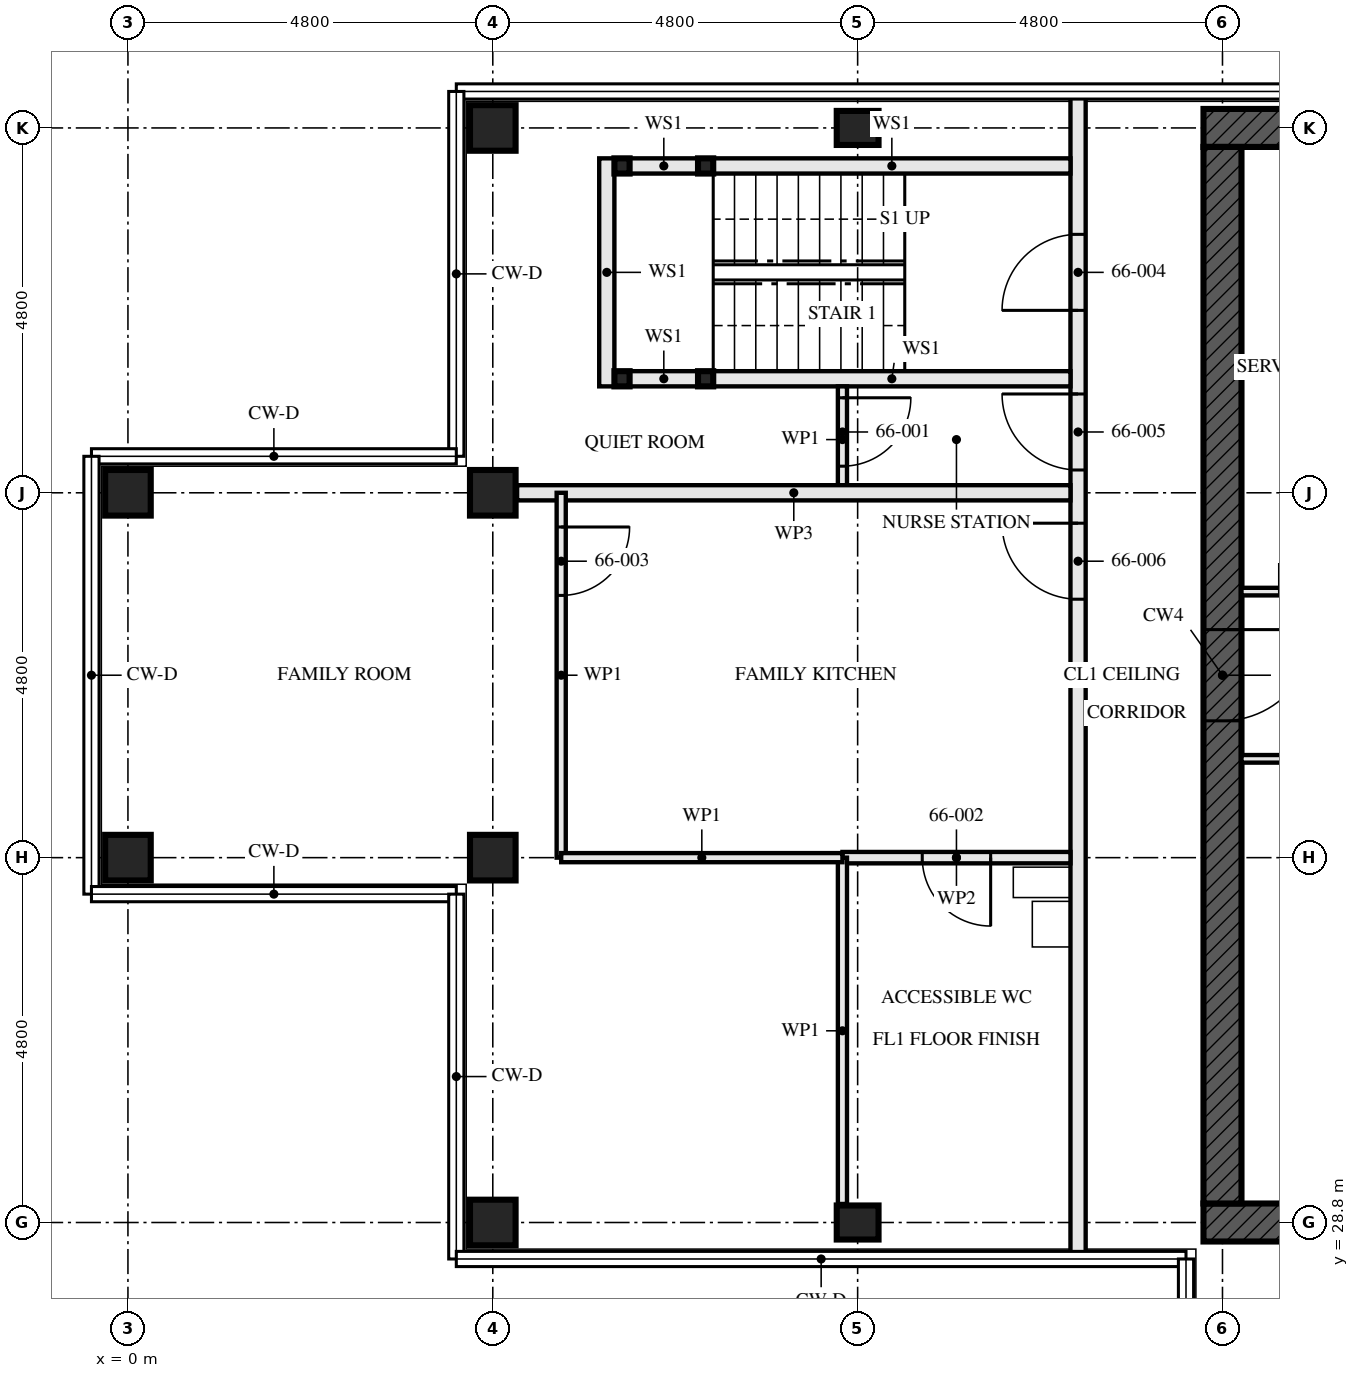
"""IFC4 building model, lengths in metres.
Left out: names, types, materials, properties, quantities, classifications, styles, units other than length and angle.
Written with IfcOpenShell. Run it as: python <this file> out.ifc"""

import sys

from ifc_helpers import new_model, si_unit, direction, frame, frame_2d, origin, origin_2d, place, context, subcontext, project, spatial, rectangle, hollow_rectangle, i_section, extrude, element, fill, save


model = new_model("IFC4")
c1 = context("Model", 3, precision=1e-05, world=origin(), true_north=direction((0.0, 1.0)))
c2 = subcontext(c1, "Body", "Model", "MODEL_VIEW")
j1 = project(units=[si_unit("LENGTHUNIT", "METRE"), si_unit("PLANEANGLEUNIT", "RADIAN")], contexts=[c1])
p1 = place(None, origin())
s1 = spatial("IfcSite", under=j1, at=p1, CompositionType="ELEMENT")
p2 = place(p1, origin())
s2 = spatial("IfcBuilding", under=s1, at=p2, CompositionType="ELEMENT")
p3 = place(p2, frame((0.0, 0.0, 240.0)))
s3 = spatial("IfcBuildingStorey", under=s2, at=p3, CompositionType="ELEMENT", Elevation=240.0)
for number, where, z_axis, x_axis in (
    (1, (0.0, 33.6, 0.0), (0.0, 0.0, 1.0), (0.0, 1.0, 0.0)),
    (2, (0.0, 38.4, 0.0), (0.0, 0.0, 1.0), (0.0, 1.0, 0.0)),
    (3, (4.8, 28.8, 0.0), (0.0, 0.0, 1.0), (0.0, 1.0, 0.0)),
    (4, (4.8, 33.6, 0.0), (0.0, 0.0, 1.0), (0.0, 1.0, 0.0)),
    (5, (4.8, 38.4, 0.0), (0.0, 0.0, 1.0), (0.0, 1.0, 0.0)),
    (6, (4.8, 43.2, 0.0), (0.0, 0.0, 1.0), (0.0, 1.0, 0.0)),
):
    element("IfcColumn", number, at=place(p3, frame(where, z_axis=z_axis, x_axis=x_axis)), inside=s3, PredefinedType="COLUMN", context=c2, shape_type="SweptSolid", body=[
        extrude(hollow_rectangle(XDim=0.6, YDim=0.6, WallThickness=0.05, at=origin_2d()), origin(), (0.0, 0.0, 1.0), 3.5),
    ])
for number, where, z_axis, x_axis in (
    (7, (9.6, 28.8, 0.0), (0.0, 0.0, 1.0), (0.0, 1.0, 0.0)),
    (8, (9.6, 43.2, 0.0), (0.0, 0.0, 1.0), (0.0, 1.0, 0.0)),
):
    element("IfcColumn", number, at=place(p3, frame(where, z_axis=z_axis, x_axis=x_axis)), inside=s3, PredefinedType="COLUMN", context=c2, shape_type="SweptSolid", body=[
        extrude(i_section(OverallWidth=0.448, OverallDepth=0.55, WebThickness=0.072, FlangeThickness=0.115, FilletRadius=0.015, at=origin_2d()), origin(), (0.0, 0.0, 1.0), 3.5),
    ])
p4 = place(p3, frame((14.15, 28.8, -0.17), z_axis=(0.0, 0.0, 1.0), x_axis=(1.0, 0.0, 0.0)))
e9 = element("IfcWall", 9, at=p4, inside=s3, PredefinedType="SHEAR", context=c2, shape_type="SweptSolid", body=[
    extrude(rectangle(XDim=14.9, YDim=0.5, at=frame_2d((7.45, 0.0))), origin(), (0.0, 0.0, 1.0), 3.42),
])
p5 = place(p4, frame((6.85, 0.0, 0.17)))
e10 = element("IfcOpeningElement", 10, at=p5, cuts=e9, PredefinedType="OPENING", context=c2, shape_type="SweptSolid", body=[
    extrude(rectangle(XDim=1.2, YDim=2.1, at=frame_2d((0.6, 1.05))), frame((0.0, 0.26, 0.0), z_axis=(0.0, -1.0, 0.0), x_axis=(1.0, 0.0, 0.0)), (0.0, 0.0, 1.0), 0.521),
])
p6 = place(p3, frame((29.05, 43.2, -0.17), z_axis=(0.0, 0.0, 1.0), x_axis=(-1.0, 0.0, 0.0)))
e11 = element("IfcWall", 11, at=p6, inside=s3, PredefinedType="SHEAR", context=c2, shape_type="SweptSolid", body=[
    extrude(rectangle(XDim=14.9, YDim=0.5, at=frame_2d((7.45, 0.0))), origin(), (0.0, 0.0, 1.0), 3.42),
])
p7 = place(p3, frame((14.4, 42.95, -0.17), z_axis=(0.0, 0.0, 1.0), x_axis=(0.0, -1.0, 0.0)))
e12 = element("IfcWall", 12, at=p7, inside=s3, PredefinedType="SHEAR", context=c2, shape_type="SweptSolid", body=[
    extrude(rectangle(XDim=13.9, YDim=0.5, at=frame_2d((6.95, 0.0))), origin(), (0.0, 0.0, 1.0), 3.42),
])
p8 = place(p7, frame((6.35, 0.0, 0.17)))
e13 = element("IfcOpeningElement", 13, at=p8, cuts=e12, PredefinedType="OPENING", context=c2, shape_type="SweptSolid", body=[
    extrude(rectangle(XDim=1.2, YDim=2.1, at=frame_2d((0.6, 1.05))), frame((0.0, 0.26, 0.0), z_axis=(0.0, -1.0, 0.0), x_axis=(1.0, 0.0, 0.0)), (0.0, 0.0, 1.0), 0.521),
])
for number, where, z_axis, x_axis in (
    (14, (6.5, 42.7, 0.0), (0.0, 0.0, 1.0), (1.0, 0.0, 0.0)),
    (15, (6.5, 39.9, 0.0), (0.0, 0.0, 1.0), (1.0, 0.0, 0.0)),
    (16, (7.6, 42.7, 0.0), (0.0, 0.0, 1.0), (1.0, 0.0, 0.0)),
    (17, (7.6, 39.9, 0.0), (0.0, 0.0, 1.0), (1.0, 0.0, 0.0)),
):
    element("IfcColumn", number, at=place(p3, frame(where, z_axis=z_axis, x_axis=x_axis)), inside=s3, PredefinedType="COLUMN", context=c2, shape_type="SweptSolid", body=[
        extrude(hollow_rectangle(XDim=0.2, YDim=0.2, WallThickness=0.008, at=origin_2d()), origin(), (0.0, 0.0, 1.0), 3.25),
    ])
p9 = place(p3, frame((6.6, 42.7, 0.0), z_axis=(0.0, 0.0, 1.0), x_axis=(1.0, 0.0, 0.0)))
e18 = element("IfcWall", 18, at=p9, inside=s3, PredefinedType="SOLIDWALL", context=c2, shape_type="SweptSolid", body=[
    extrude(rectangle(XDim=0.9, YDim=0.2, at=frame_2d((0.45, 0.0))), origin(), (0.0, 0.0, 1.0), 2.94),
])
p10 = place(p3, frame((7.7, 42.7, 0.0), z_axis=(0.0, 0.0, 1.0), x_axis=(1.0, 0.0, 0.0)))
e19 = element("IfcWall", 19, at=p10, inside=s3, PredefinedType="SOLIDWALL", context=c2, shape_type="SweptSolid", body=[
    extrude(rectangle(XDim=4.7, YDim=0.2, at=frame_2d((2.35, 0.0))), origin(), (0.0, 0.0, 1.0), 2.94),
])
p11 = place(p3, frame((6.6, 39.9, 0.0), z_axis=(0.0, 0.0, 1.0), x_axis=(1.0, 0.0, 0.0)))
e20 = element("IfcWall", 20, at=p11, inside=s3, PredefinedType="SOLIDWALL", context=c2, shape_type="SweptSolid", body=[
    extrude(rectangle(XDim=0.9, YDim=0.2, at=frame_2d((0.45, 0.0))), origin(), (0.0, 0.0, 1.0), 2.94),
])
p12 = place(p3, frame((7.7, 39.9, 0.0), z_axis=(0.0, 0.0, 1.0), x_axis=(1.0, 0.0, 0.0)))
e21 = element("IfcWall", 21, at=p12, inside=s3, PredefinedType="SOLIDWALL", context=c2, shape_type="SweptSolid", body=[
    extrude(rectangle(XDim=4.7, YDim=0.2, at=frame_2d((2.35, 0.0))), origin(), (0.0, 0.0, 1.0), 2.94),
])
p13 = place(p3, frame((6.3, 42.8, 0.0), z_axis=(0.0, 0.0, 1.0), x_axis=(0.0, -1.0, 0.0)))
e22 = element("IfcWall", 22, at=p13, inside=s3, PredefinedType="SOLIDWALL", context=c2, shape_type="SweptSolid", body=[
    extrude(rectangle(XDim=3.0, YDim=0.2, at=frame_2d((1.5, 0.0))), origin(), (0.0, 0.0, 1.0), 3.25),
])
p14 = place(p3, frame((9.4, 39.8, 0.0), z_axis=(0.0, 0.0, 1.0), x_axis=(0.0, -1.0, 0.0)))
e23 = element("IfcWall", 23, at=p14, inside=s3, PredefinedType="PARTITIONING", context=c2, shape_type="SweptSolid", body=[
    extrude(rectangle(XDim=1.4, YDim=0.12, at=frame_2d((0.7, 0.0))), origin(), (0.0, 0.0, 1.0), 3.25),
])
p15 = place(p14, frame((0.15, 0.0, 0.0)))
e24 = element("IfcOpeningElement", 24, at=p15, cuts=e23, PredefinedType="OPENING", context=c2, shape_type="SweptSolid", body=[
    extrude(rectangle(XDim=0.9, YDim=2.1, at=frame_2d((0.45, 1.05))), frame((0.0, 0.071, 0.0), z_axis=(0.0, -1.0, 0.0), x_axis=(1.0, 0.0, 0.0)), (0.0, 0.0, 1.0), 0.141),
])
p16 = place(p3, frame((5.12, 38.4, 0.0), z_axis=(0.0, 0.0, 1.0), x_axis=(1.0, 0.0, 0.0)))
e25 = element("IfcWall", 25, at=p16, inside=s3, PredefinedType="PARTITIONING", context=c2, shape_type="SweptSolid", body=[
    extrude(rectangle(XDim=7.28, YDim=0.2, at=frame_2d((3.64, 0.0))), origin(), (0.0, 0.0, 1.0), 2.24),
])
p17 = place(p3, frame((9.4, 33.6, 0.0), z_axis=(0.0, 0.0, 1.0), x_axis=(1.0, 0.0, 0.0)))
e26 = element("IfcWall", 26, at=p17, inside=s3, PredefinedType="PARTITIONING", context=c2, shape_type="SweptSolid", body=[
    extrude(rectangle(XDim=3.0, YDim=0.15, at=frame_2d((1.5, 0.0))), origin(), (0.0, 0.0, 1.0), 2.24),
])
p18 = place(p17, frame((1.05, 0.0, 0.0)))
e27 = element("IfcOpeningElement", 27, at=p18, cuts=e26, PredefinedType="OPENING", context=c2, shape_type="SweptSolid", body=[
    extrude(rectangle(XDim=0.9, YDim=2.1, at=frame_2d((0.45, 1.05))), frame((0.0, 0.085, 0.0), z_axis=(0.0, -1.0, 0.0), x_axis=(1.0, 0.0, 0.0)), (0.0, 0.0, 1.0), 0.171),
])
p19 = place(p3, frame((5.7, 38.4, 0.0), z_axis=(0.0, 0.0, 1.0), x_axis=(0.0, -1.0, 0.0)))
e28 = element("IfcWall", 28, at=p19, inside=s3, PredefinedType="PARTITIONING", context=c2, shape_type="SweptSolid", body=[
    extrude(rectangle(XDim=4.8, YDim=0.12, at=frame_2d((2.4, 0.0))), origin(), (0.0, 0.0, 1.0), 3.25),
])
p20 = place(p19, frame((0.45, 0.0, 0.0)))
e29 = element("IfcOpeningElement", 29, at=p20, cuts=e28, PredefinedType="OPENING", context=c2, shape_type="SweptSolid", body=[
    extrude(rectangle(XDim=0.9, YDim=2.1, at=frame_2d((0.45, 1.05))), frame((0.0, 0.071, 0.0), z_axis=(0.0, -1.0, 0.0), x_axis=(1.0, 0.0, 0.0)), (0.0, 0.0, 1.0), 0.141),
])
p21 = place(p3, frame((9.4, 33.6, 0.0), z_axis=(0.0, 0.0, 1.0), x_axis=(0.0, -1.0, 0.0)))
e30 = element("IfcWall", 30, at=p21, inside=s3, PredefinedType="PARTITIONING", context=c2, shape_type="SweptSolid", body=[
    extrude(rectangle(XDim=4.556, YDim=0.12, at=frame_2d((2.278, 0.0))), origin(), (0.0, 0.0, 1.0), 3.25),
])
p22 = place(p3, frame((5.7, 33.6, 0.0), z_axis=(0.0, 0.0, 1.0), x_axis=(1.0, 0.0, 0.0)))
e31 = element("IfcWall", 31, at=p22, inside=s3, PredefinedType="PARTITIONING", context=c2, shape_type="SweptSolid", body=[
    extrude(rectangle(XDim=3.7, YDim=0.12, at=frame_2d((1.85, 0.0))), origin(), (0.0, 0.0, 1.0), 2.24),
])
p23 = place(p3, frame((12.5, 43.655, 0.0), z_axis=(0.0, 0.0, 1.0), x_axis=(0.0, -1.0, 0.0)))
e32 = element("IfcWall", 32, at=p23, inside=s3, PredefinedType="PARTITIONING", context=c2, shape_type="SweptSolid", body=[
    extrude(rectangle(XDim=15.31, YDim=0.2, at=frame_2d((7.655, 0.0))), origin(), (0.0, 0.0, 1.0), 2.24),
])
p24 = place(p23, frame((1.855, 0.0, 0.0)))
e33 = element("IfcOpeningElement", 33, at=p24, cuts=e32, PredefinedType="OPENING", context=c2, shape_type="SweptSolid", body=[
    extrude(rectangle(XDim=1.0, YDim=2.1, at=frame_2d((0.5, 1.05))), frame((0.0, 0.111, 0.0), z_axis=(0.0, -1.0, 0.0), x_axis=(1.0, 0.0, 0.0)), (0.0, 0.0, 1.0), 0.221),
])
p25 = place(p23, frame((3.955, 0.0, 0.0)))
e34 = element("IfcOpeningElement", 34, at=p25, cuts=e32, PredefinedType="OPENING", context=c2, shape_type="SweptSolid", body=[
    extrude(rectangle(XDim=1.0, YDim=2.1, at=frame_2d((0.5, 1.05))), frame((0.0, 0.111, 0.0), z_axis=(0.0, -1.0, 0.0), x_axis=(1.0, 0.0, 0.0)), (0.0, 0.0, 1.0), 0.221),
])
p26 = place(p23, frame((5.655, 0.0, 0.0)))
e35 = element("IfcOpeningElement", 35, at=p26, cuts=e32, PredefinedType="OPENING", context=c2, shape_type="SweptSolid", body=[
    extrude(rectangle(XDim=1.0, YDim=2.1, at=frame_2d((0.5, 1.05))), frame((0.0, 0.111, 0.0), z_axis=(0.0, -1.0, 0.0), x_axis=(1.0, 0.0, 0.0)), (0.0, 0.0, 1.0), 0.221),
])
p27 = place(p3, frame((14.65, 34.9, 0.0), z_axis=(0.0, 0.0, 1.0), x_axis=(1.0, 0.0, 0.0)))
e36 = element("IfcWall", 36, at=p27, inside=s3, PredefinedType="SOLIDWALL", context=c2, shape_type="SweptSolid", body=[
    extrude(rectangle(XDim=5.9, YDim=0.1, at=frame_2d((2.95, 0.0))), origin(), (0.0, 0.0, 1.0), 3.25),
])
p28 = place(p27, frame((1.6, 0.0, 0.0)))
e37 = element("IfcOpeningElement", 37, at=p28, cuts=e36, PredefinedType="OPENING", context=c2, shape_type="SweptSolid", body=[
    extrude(rectangle(XDim=0.7, YDim=2.1, at=frame_2d((0.35, 1.05))), frame((0.0, 0.061, 0.0), z_axis=(0.0, -1.0, 0.0), x_axis=(1.0, 0.0, 0.0)), (0.0, 0.0, 1.0), 0.121),
])
p29 = place(p3, frame((14.65, 37.1, 0.0), z_axis=(0.0, 0.0, 1.0), x_axis=(1.0, 0.0, 0.0)))
e38 = element("IfcWall", 38, at=p29, inside=s3, PredefinedType="SOLIDWALL", context=c2, shape_type="SweptSolid", body=[
    extrude(rectangle(XDim=5.9, YDim=0.1, at=frame_2d((2.95, 0.0))), origin(), (0.0, 0.0, 1.0), 3.25),
])
p30 = place(p29, frame((0.5, 0.0, 0.0)))
e39 = element("IfcOpeningElement", 39, at=p30, cuts=e38, PredefinedType="OPENING", context=c2, shape_type="SweptSolid", body=[
    extrude(rectangle(XDim=0.7, YDim=2.1, at=frame_2d((0.35, 1.05))), frame((0.0, 0.061, 0.0), z_axis=(0.0, -1.0, 0.0), x_axis=(1.0, 0.0, 0.0)), (0.0, 0.0, 1.0), 0.121),
])
p31 = place(p29, frame((1.9, 0.0, 0.0)))
e40 = element("IfcOpeningElement", 40, at=p31, cuts=e38, PredefinedType="OPENING", context=c2, shape_type="SweptSolid", body=[
    extrude(rectangle(XDim=0.9, YDim=2.1, at=frame_2d((0.45, 1.05))), frame((0.0, 0.061, 0.0), z_axis=(0.0, -1.0, 0.0), x_axis=(1.0, 0.0, 0.0)), (0.0, 0.0, 1.0), 0.121),
])
p32 = place(p15, origin())
e41 = element("IfcDoor", 41, at=p32, inside=s3, OperationType="SINGLE_SWING_RIGHT", PredefinedType="DOOR", context=c2, shape_type="SweptSolid", body=[
    extrude(rectangle(XDim=0.9, YDim=2.1, at=frame_2d((0.45, 1.05))), frame((0.0, 0.022, 0.0), z_axis=(0.0, -1.0, 0.0), x_axis=(1.0, 0.0, 0.0)), (0.0, 0.0, 1.0), 0.044),
])
fill(e24, e41)
p33 = place(p18, frame((0.9, 0.0, 0.0), z_axis=(0.0, 0.0, 1.0), x_axis=(-1.0, 0.0, 0.0)))
e42 = element("IfcDoor", 42, at=p33, inside=s3, OperationType="SINGLE_SWING_RIGHT", PredefinedType="DOOR", context=c2, shape_type="SweptSolid", body=[
    extrude(rectangle(XDim=0.9, YDim=2.1, at=frame_2d((0.45, 1.05))), frame((0.0, 0.022, 0.0), z_axis=(0.0, -1.0, 0.0), x_axis=(1.0, 0.0, 0.0)), (0.0, 0.0, 1.0), 0.044),
])
fill(e27, e42)
p34 = place(p20, origin())
e43 = element("IfcDoor", 43, at=p34, inside=s3, OperationType="SINGLE_SWING_RIGHT", PredefinedType="DOOR", context=c2, shape_type="SweptSolid", body=[
    extrude(rectangle(XDim=0.9, YDim=2.1, at=frame_2d((0.45, 1.05))), frame((0.0, 0.022, 0.0), z_axis=(0.0, -1.0, 0.0), x_axis=(1.0, 0.0, 0.0)), (0.0, 0.0, 1.0), 0.044),
])
fill(e29, e43)
p35 = place(p24, frame((1.0, 0.0, 0.0), z_axis=(0.0, 0.0, 1.0), x_axis=(-1.0, 0.0, 0.0)))
e44 = element("IfcDoor", 44, at=p35, inside=s3, OperationType="SINGLE_SWING_RIGHT", PredefinedType="DOOR", context=c2, shape_type="SweptSolid", body=[
    extrude(rectangle(XDim=1.0, YDim=2.1, at=frame_2d((0.5, 1.05))), frame((0.0, 0.032, 0.0), z_axis=(0.0, -1.0, 0.0), x_axis=(1.0, 0.0, 0.0)), (0.0, 0.0, 1.0), 0.064),
])
fill(e33, e44)
p36 = place(p25, frame((1.0, 0.0, 0.0), z_axis=(0.0, 0.0, 1.0), x_axis=(-1.0, 0.0, 0.0)))
e45 = element("IfcDoor", 45, at=p36, inside=s3, OperationType="SINGLE_SWING_LEFT", PredefinedType="DOOR", context=c2, shape_type="SweptSolid", body=[
    extrude(rectangle(XDim=1.0, YDim=2.1, at=frame_2d((0.5, 1.05))), frame((0.0, 0.027, 0.0), z_axis=(0.0, -1.0, 0.0), x_axis=(1.0, 0.0, 0.0)), (0.0, 0.0, 1.0), 0.054),
])
fill(e34, e45)
p37 = place(p26, frame((1.0, 0.0, 0.0), z_axis=(0.0, 0.0, 1.0), x_axis=(-1.0, 0.0, 0.0)))
e46 = element("IfcDoor", 46, at=p37, inside=s3, OperationType="SINGLE_SWING_LEFT", PredefinedType="DOOR", context=c2, shape_type="SweptSolid", body=[
    extrude(rectangle(XDim=1.0, YDim=2.1, at=frame_2d((0.5, 1.05))), frame((0.0, 0.027, 0.0), z_axis=(0.0, -1.0, 0.0), x_axis=(1.0, 0.0, 0.0)), (0.0, 0.0, 1.0), 0.054),
])
fill(e35, e46)
p38 = place(p8, origin())
e47 = element("IfcDoor", 47, at=p38, inside=s3, OperationType="SINGLE_SWING_LEFT", PredefinedType="DOOR", context=c2, shape_type="SweptSolid", body=[
    extrude(rectangle(XDim=1.2, YDim=2.1, at=frame_2d((0.6, 1.05))), frame((0.0, 0.027, 0.0), z_axis=(0.0, -1.0, 0.0), x_axis=(1.0, 0.0, 0.0)), (0.0, 0.0, 1.0), 0.054),
])
fill(e13, e47)
save(model, sys.argv[1])
